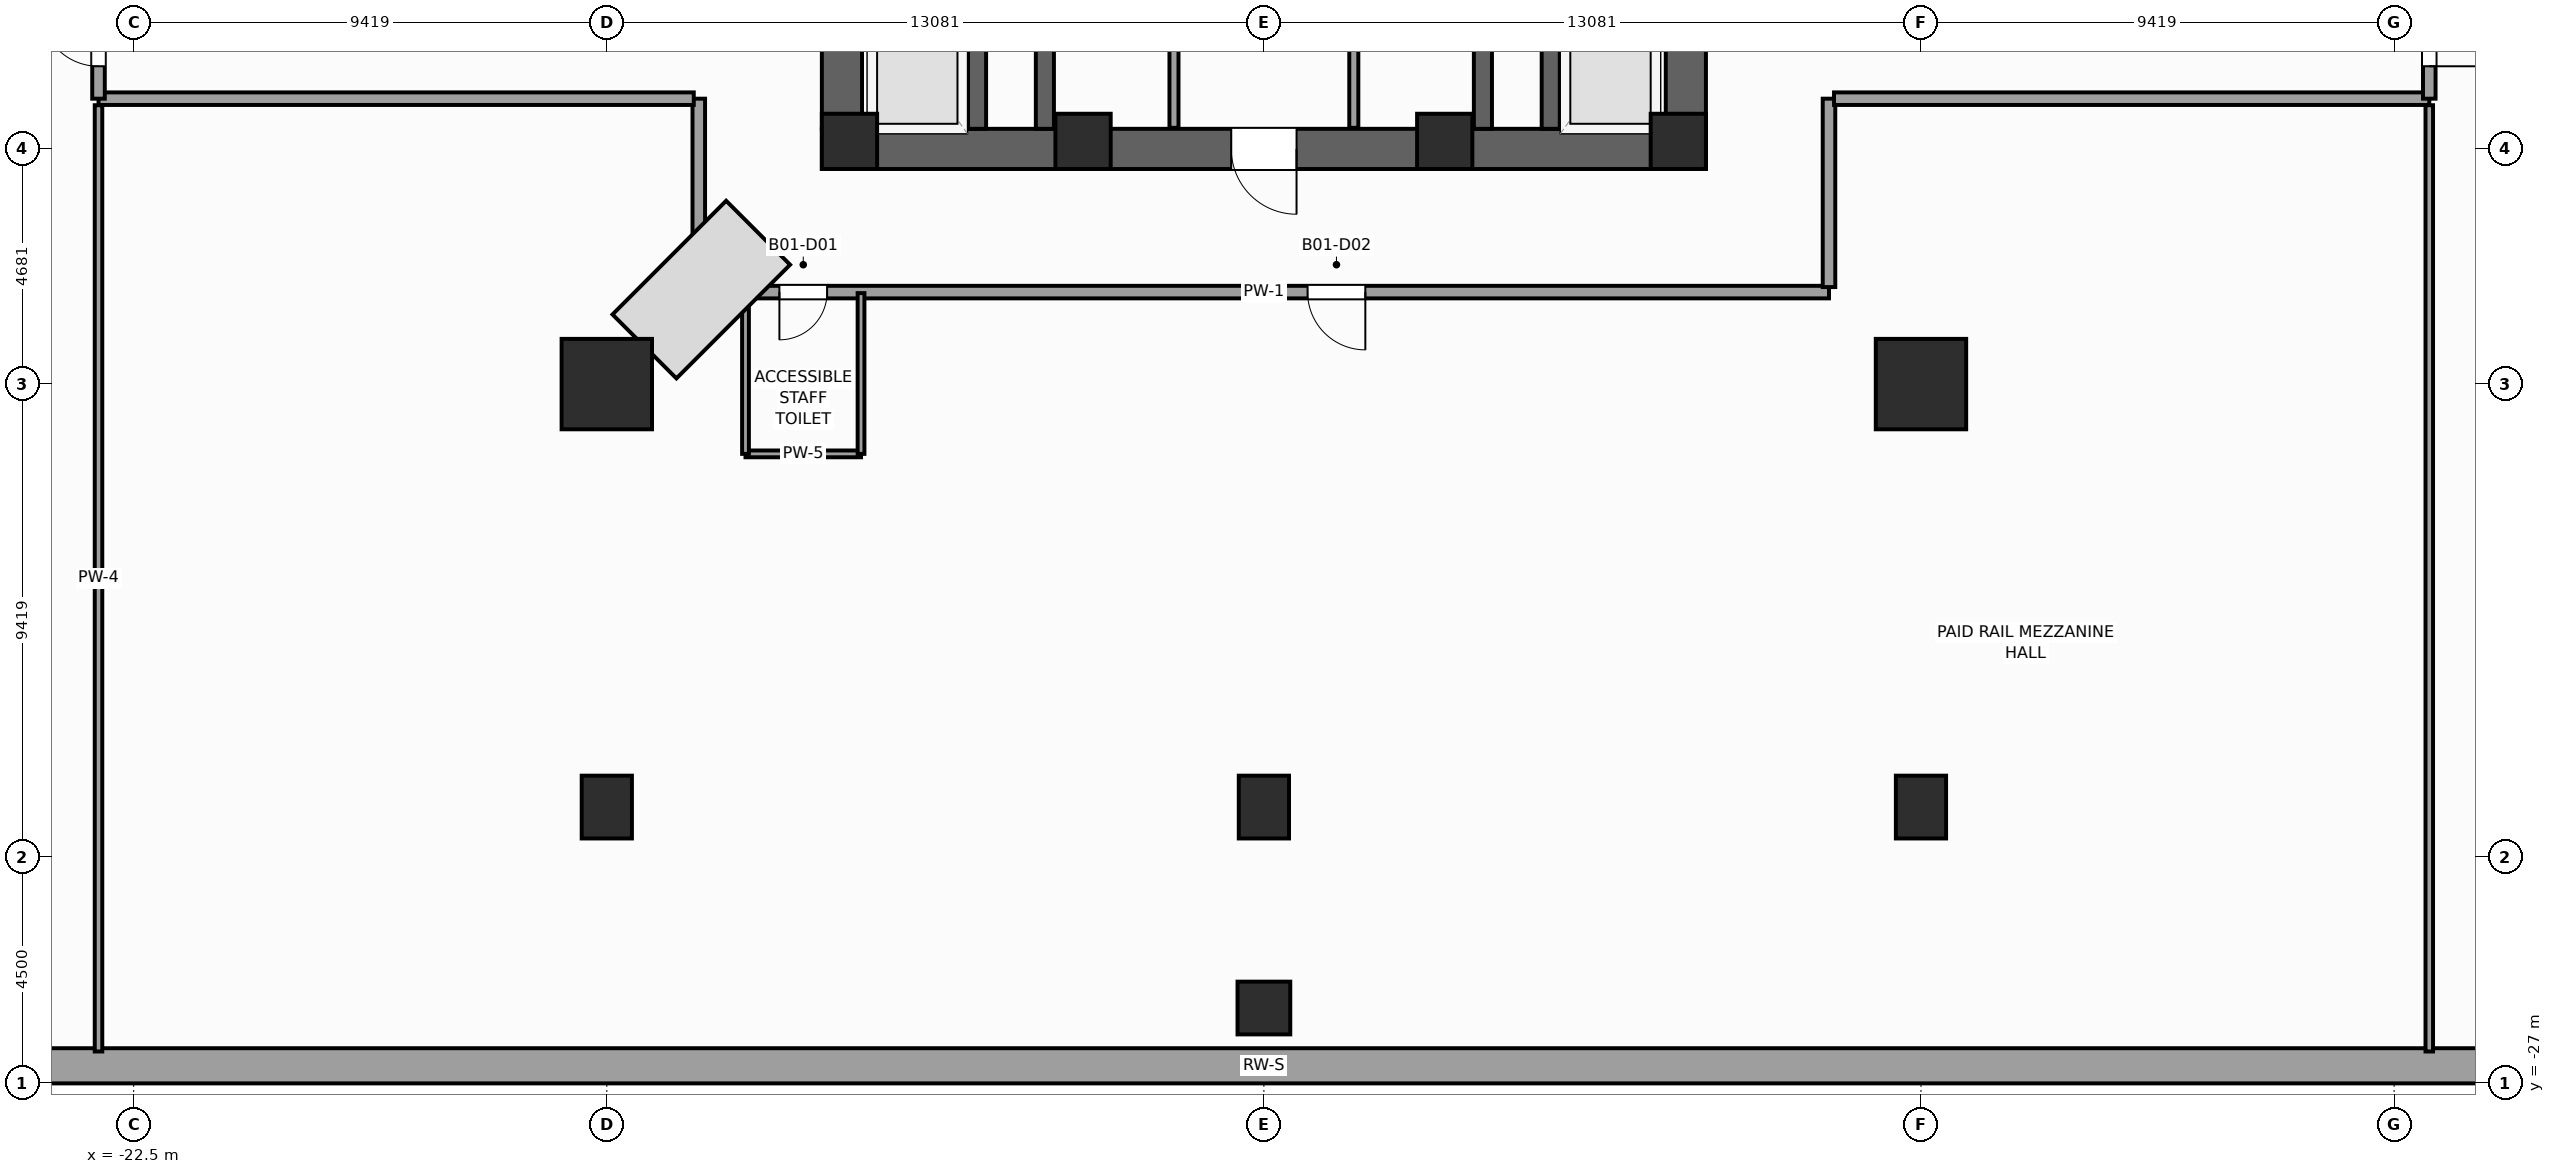
"""IFC4 building model, lengths in metres.
Left out: names, types, materials, properties, quantities, classifications, styles, units other than length and angle.
Written with IfcOpenShell. Run it as: python <this file> out.ifc"""

import sys

from ifc_helpers import new_model, si_unit, direction, frame, frame_2d, origin, origin_2d, place, context, subcontext, project, spatial, rectangle, extrude, source, transform, mapped, element, fill, save


model = new_model("IFC4")
c1 = context("Model", 3, precision=1e-05, world=origin(), true_north=direction((0.0, 1.0)))
c2 = subcontext(c1, "Body", "Model", "MODEL_VIEW")
j1 = project(units=[si_unit("LENGTHUNIT", "METRE"), si_unit("PLANEANGLEUNIT", "RADIAN")], contexts=[c1])
p1 = place(None, origin())
s1 = spatial("IfcSite", under=j1, at=p1, CompositionType="ELEMENT")
p2 = place(p1, origin())
s2 = spatial("IfcBuilding", under=s1, at=p2, CompositionType="ELEMENT")
p3 = place(p2, frame((0.0, 0.0, -4.5)))
s3 = spatial("IfcBuildingStorey", under=s2, at=p3, CompositionType="ELEMENT", Elevation=-4.5)
p4 = place(p3, frame((-8.8, -8.4, 0.0), z_axis=(0.0, 0.0, 1.0), x_axis=(1.0, 0.0, 0.0)))
e1 = element("IfcWall", 1, at=p4, inside=s3, PredefinedType="SHEAR", context=c2, shape_type="SweptSolid", body=[
    extrude(rectangle(XDim=17.6, YDim=0.8, at=frame_2d((8.8, 0.0))), origin(), (0.0, 0.0, 1.0), 4.5),
])
p5 = place(p4, frame((8.15, 0.0, 0.0)))
e2 = element("IfcOpeningElement", 2, at=p5, cuts=e1, PredefinedType="OPENING", context=c2, shape_type="SweptSolid", body=[
    extrude(rectangle(XDim=1.3, YDim=2.2, at=frame_2d((0.65, 1.1))), frame((0.0, 0.41, 0.0), z_axis=(0.0, -1.0, 0.0), x_axis=(1.0, 0.0, 0.0)), (0.0, 0.0, 1.0), 0.82),
])
p6 = place(p3, frame((-8.4, -8.0, 0.0), z_axis=(0.0, 0.0, 1.0), x_axis=(0.0, 1.0, 0.0)))
e3 = element("IfcWall", 3, at=p6, inside=s3, PredefinedType="SHEAR", context=c2, shape_type="SweptSolid", body=[
    extrude(rectangle(XDim=16.0, YDim=0.8, at=frame_2d((8.0, 0.0))), origin(), (0.0, 0.0, 1.0), 4.5),
])
p7 = place(p6, frame((4.69, 0.0, 0.0)))
e4 = element("IfcOpeningElement", 4, at=p7, cuts=e3, PredefinedType="OPENING", context=c2, shape_type="SweptSolid", body=[
    extrude(rectangle(XDim=1.3, YDim=2.2, at=frame_2d((0.65, 1.1))), frame((0.0, 0.41, 0.0), z_axis=(0.0, -1.0, 0.0), x_axis=(1.0, 0.0, 0.0)), (0.0, 0.0, 1.0), 0.82),
])
p8 = place(p3, frame((8.4, -8.0, 0.0), z_axis=(0.0, 0.0, 1.0), x_axis=(0.0, 1.0, 0.0)))
e5 = element("IfcWall", 5, at=p8, inside=s3, PredefinedType="SHEAR", context=c2, shape_type="SweptSolid", body=[
    extrude(rectangle(XDim=16.0, YDim=0.8, at=frame_2d((8.0, 0.0))), origin(), (0.0, 0.0, 1.0), 4.5),
])
p9 = place(p8, frame((4.69, 0.0, 0.0)))
e6 = element("IfcOpeningElement", 6, at=p9, cuts=e5, PredefinedType="OPENING", context=c2, shape_type="SweptSolid", body=[
    extrude(rectangle(XDim=1.3, YDim=2.2, at=frame_2d((0.65, 1.1))), frame((0.0, 0.41, 0.0), z_axis=(0.0, -1.0, 0.0), x_axis=(1.0, 0.0, 0.0)), (0.0, 0.0, 1.0), 0.82),
])
for number, where, z_axis, x_axis in (
    (7, (-4.36, -8.0, 0.0), (0.0, 0.0, 1.0), (0.0, 1.0, 0.0)),
    (8, (4.36, -8.0, 0.0), (0.0, 0.0, 1.0), (0.0, 1.0, 0.0)),
):
    element("IfcWall", number, at=place(p3, frame(where, z_axis=z_axis, x_axis=x_axis)), inside=s3, PredefinedType="SHEAR", context=c2, shape_type="SweptSolid", body=[
        extrude(rectangle(XDim=16.0, YDim=0.36, at=frame_2d((8.0, 0.0))), origin(), (0.0, 0.0, 1.0), 4.5),
    ])
for number, where, z_axis, x_axis in (
    (9, (-5.71, -8.0, 0.0), (0.0, 0.0, 1.0), (0.0, 1.0, 0.0)),
    (10, (5.71, -8.0, 0.0), (0.0, 0.0, 1.0), (0.0, 1.0, 0.0)),
):
    element("IfcWall", number, at=place(p3, frame(where, z_axis=z_axis, x_axis=x_axis)), inside=s3, PredefinedType="SHEAR", context=c2, shape_type="SweptSolid", body=[
        extrude(rectangle(XDim=2.54, YDim=0.36, at=frame_2d((1.27, 0.0))), origin(), (0.0, 0.0, 1.0), 4.5),
    ])
p10 = place(p3, frame((-42.0, -26.65, 0.0), z_axis=(0.0, 0.0, 1.0), x_axis=(1.0, 0.0, 0.0)))
e11 = element("IfcWall", 11, at=p10, inside=s3, PredefinedType="USERDEFINED", context=c2, shape_type="SweptSolid", body=[
    extrude(rectangle(XDim=84.0, YDim=0.7, at=frame_2d((42.0, 0.0))), origin(), (0.0, 0.0, 1.0), 4.5),
])
m1 = source(origin(), c2, "Body", "SweptSolid", [
    extrude(rectangle(XDim=1.1, YDim=1.1, at=origin_2d()), origin(), (0.0, 0.0, 1.0), 4.5),
])
for number, where, z_axis, x_axis in (
    (12, (-8.25, -8.25, 0.0), (0.0, 0.0, 1.0), (1.0, 0.0, 0.0)),
    (13, (8.25, -8.25, 0.0), (0.0, 0.0, 1.0), (1.0, 0.0, 0.0)),
    (14, (-3.6, -8.25, 0.0), (0.0, 0.0, 1.0), (1.0, 0.0, 0.0)),
    (15, (3.6, -8.25, 0.0), (0.0, 0.0, 1.0), (1.0, 0.0, 0.0)),
):
    element("IfcColumn", number, at=place(p3, frame(where, z_axis=z_axis, x_axis=x_axis)), inside=s3, PredefinedType="PILASTER", context=c2, shape_type="MappedRepresentation", body=[
        mapped(m1, transform((0.0, 0.0, 0.0), scale=1.0)),
    ])
m2 = source(origin(), c2, "Body", "SweptSolid", [
    extrude(rectangle(XDim=1.8, YDim=1.8, at=origin_2d()), origin(), (0.0, 0.0, 1.0), 4.5),
])
for number, where, z_axis, x_axis in (
    (16, (-13.081, -13.081, 0.0), (0.0, 0.0, 1.0), (1.0, 0.0, 0.0)),
    (17, (13.081, -13.081, 0.0), (0.0, 0.0, 1.0), (1.0, 0.0, 0.0)),
):
    element("IfcColumn", number, at=place(p3, frame(where, z_axis=z_axis, x_axis=x_axis)), inside=s3, PredefinedType="COLUMN", context=c2, shape_type="MappedRepresentation", body=[
        mapped(m2, transform((0.0, 0.0, 0.0), scale=1.0)),
    ])
m3 = source(origin(), c2, "Body", "SweptSolid", [
    extrude(rectangle(XDim=1.0, YDim=1.25, at=origin_2d()), origin(), (0.0, 0.0, 1.0), 4.5),
])
for number, where, z_axis, x_axis in (
    (18, (-13.081, -21.5, 0.0), (0.0, 0.0, 1.0), (1.0, 0.0, 0.0)),
    (19, (0.0, -21.5, 0.0), (0.0, 0.0, 1.0), (1.0, 0.0, 0.0)),
    (20, (13.081, -21.5, 0.0), (0.0, 0.0, 1.0), (1.0, 0.0, 0.0)),
):
    element("IfcColumn", number, at=place(p3, frame(where, z_axis=z_axis, x_axis=x_axis)), inside=s3, PredefinedType="COLUMN", context=c2, shape_type="MappedRepresentation", body=[
        mapped(m3, transform((0.0, 0.0, 0.0), scale=1.0)),
    ])
m4 = source(origin(), c2, "Body", "SweptSolid", [
    extrude(rectangle(XDim=1.05, YDim=1.05, at=origin_2d()), origin(), (0.0, 0.0, 1.0), 4.5),
])
p11 = place(p3, frame((0.0, -25.5, 0.0), z_axis=(0.0, 0.0, 1.0), x_axis=(1.0, 0.0, 0.0)))
e21 = element("IfcColumn", 21, at=p11, inside=s3, PredefinedType="COLUMN", context=c2, shape_type="MappedRepresentation", body=[
    mapped(m4, transform((0.0, 0.0, 0.0), scale=1.0)),
])
for number, where, z_axis, x_axis in (
    (22, (-1.79, -7.98, 0.0), (0.0, 0.0, 1.0), (0.0, 1.0, 0.0)),
    (23, (1.79, -7.98, 0.0), (0.0, 0.0, 1.0), (0.0, 1.0, 0.0)),
):
    element("IfcWall", number, at=place(p3, frame(where, z_axis=z_axis, x_axis=x_axis)), inside=s3, PredefinedType="PARTITIONING", context=c2, shape_type="SweptSolid", body=[
        extrude(rectangle(XDim=12.38, YDim=0.18, at=frame_2d((6.19, 0.0))), origin(), (0.0, 0.0, 1.0), 4.1),
    ])
p12 = place(p3, frame((-11.25, -11.25, 0.0), z_axis=(0.0, 0.0, 1.0), x_axis=(1.0, 0.0, 0.0)))
e24 = element("IfcWall", 24, at=p12, inside=s3, PredefinedType="PARTITIONING", context=c2, shape_type="SweptSolid", body=[
    extrude(rectangle(XDim=22.5, YDim=0.25, at=frame_2d((11.25, 0.0))), origin(), (0.0, 0.0, 1.0), 4.1),
])
p13 = place(p12, frame((1.605, 0.0, 0.0)))
e25 = element("IfcOpeningElement", 25, at=p13, cuts=e24, PredefinedType="OPENING", context=c2, shape_type="SweptSolid", body=[
    extrude(rectangle(XDim=0.95, YDim=2.1, at=frame_2d((0.475, 1.05))), frame((0.0, 0.135, 0.0), z_axis=(0.0, -1.0, 0.0), x_axis=(1.0, 0.0, 0.0)), (0.0, 0.0, 1.0), 0.27),
])
p14 = place(p12, frame((12.12, 0.0, 0.0)))
e26 = element("IfcOpeningElement", 26, at=p14, cuts=e24, PredefinedType="OPENING", context=c2, shape_type="SweptSolid", body=[
    extrude(rectangle(XDim=1.15, YDim=2.25, at=frame_2d((0.575, 1.125))), frame((0.0, 0.135, 0.0), z_axis=(0.0, -1.0, 0.0), x_axis=(1.0, 0.0, 0.0)), (0.0, 0.0, 1.0), 0.27),
])
for number, where, z_axis, x_axis in (
    (27, (-11.25, -11.15, 0.0), (0.0, 0.0, 1.0), (0.0, 1.0, 0.0)),
    (28, (11.25, -11.15, 0.0), (0.0, 0.0, 1.0), (0.0, 1.0, 0.0)),
):
    element("IfcWall", number, at=place(p3, frame(where, z_axis=z_axis, x_axis=x_axis)), inside=s3, PredefinedType="PARTITIONING", context=c2, shape_type="SweptSolid", body=[
        extrude(rectangle(XDim=3.75, YDim=0.25, at=frame_2d((1.875, 0.0))), origin(), (0.0, 0.0, 1.0), 4.1),
    ])
for number, where, z_axis, x_axis in (
    (29, (-23.2, -7.4, 0.0), (0.0, 0.0, 1.0), (1.0, 0.0, 0.0)),
    (30, (11.35, -7.4, 0.0), (0.0, 0.0, 1.0), (1.0, 0.0, 0.0)),
):
    element("IfcWall", number, at=place(p3, frame(where, z_axis=z_axis, x_axis=x_axis)), inside=s3, PredefinedType="PARTITIONING", context=c2, shape_type="SweptSolid", body=[
        extrude(rectangle(XDim=11.85, YDim=0.25, at=frame_2d((5.925, 0.0))), origin(), (0.0, 0.0, 1.0), 4.1),
    ])
p15 = place(p3, frame((-23.2, -7.4, 0.0), z_axis=(0.0, 0.0, 1.0), x_axis=(0.0, 1.0, 0.0)))
e31 = element("IfcWall", 31, at=p15, inside=s3, PredefinedType="PARTITIONING", context=c2, shape_type="SweptSolid", body=[
    extrude(rectangle(XDim=2.44, YDim=0.25, at=frame_2d((1.22, 0.0))), origin(), (0.0, 0.0, 1.0), 4.1),
])
p16 = place(p15, frame((0.645, 0.0, 0.0)))
e32 = element("IfcOpeningElement", 32, at=p16, cuts=e31, PredefinedType="OPENING", context=c2, shape_type="SweptSolid", body=[
    extrude(rectangle(XDim=1.15, YDim=2.25, at=frame_2d((0.575, 1.125))), frame((0.0, 0.135, 0.0), z_axis=(0.0, -1.0, 0.0), x_axis=(1.0, 0.0, 0.0)), (0.0, 0.0, 1.0), 0.27),
])
p17 = place(p3, frame((23.2, -7.4, 0.0), z_axis=(0.0, 0.0, 1.0), x_axis=(0.0, 1.0, 0.0)))
e33 = element("IfcWall", 33, at=p17, inside=s3, PredefinedType="PARTITIONING", context=c2, shape_type="SweptSolid", body=[
    extrude(rectangle(XDim=2.44, YDim=0.25, at=frame_2d((1.22, 0.0))), origin(), (0.0, 0.0, 1.0), 4.1),
])
p18 = place(p17, frame((0.645, 0.0, 0.0)))
e34 = element("IfcOpeningElement", 34, at=p18, cuts=e33, PredefinedType="OPENING", context=c2, shape_type="SweptSolid", body=[
    extrude(rectangle(XDim=1.15, YDim=2.25, at=frame_2d((0.575, 1.125))), frame((0.0, 0.135, 0.0), z_axis=(0.0, -1.0, 0.0), x_axis=(1.0, 0.0, 0.0)), (0.0, 0.0, 1.0), 0.27),
])
for number, where, z_axis, x_axis in (
    (35, (-23.2, -26.365, 0.0), (0.0, 0.0, 1.0), (0.0, 1.0, 0.0)),
    (36, (23.2, -26.365, 0.0), (0.0, 0.0, 1.0), (0.0, 1.0, 0.0)),
):
    element("IfcWall", number, at=place(p3, frame(where, z_axis=z_axis, x_axis=x_axis)), inside=s3, PredefinedType="PARTITIONING", context=c2, shape_type="SweptSolid", body=[
        extrude(rectangle(XDim=18.835, YDim=0.15, at=frame_2d((9.417, 0.0))), origin(), (0.0, 0.0, 1.0), 4.1),
    ])
p19 = place(p3, frame((-10.32, -14.47, 0.0), z_axis=(0.0, 0.0, 1.0), x_axis=(1.0, 0.0, 0.0)))
e37 = element("IfcWall", 37, at=p19, inside=s3, PredefinedType="PARTITIONING", context=c2, shape_type="SweptSolid", body=[
    extrude(rectangle(XDim=2.3, YDim=0.135, at=frame_2d((1.15, 0.0))), origin(), (0.0, 0.0, 1.0), 4.1),
])
for number, where, z_axis, x_axis in (
    (38, (-8.02, -14.47, 0.0), (0.0, 0.0, 1.0), (0.0, 1.0, 0.0)),
    (39, (-10.32, -14.47, 0.0), (0.0, 0.0, 1.0), (0.0, 1.0, 0.0)),
):
    element("IfcWall", number, at=place(p3, frame(where, z_axis=z_axis, x_axis=x_axis)), inside=s3, PredefinedType="PARTITIONING", context=c2, shape_type="SweptSolid", body=[
        extrude(rectangle(XDim=3.2, YDim=0.135, at=frame_2d((1.6, 0.0))), origin(), (0.0, 0.0, 1.0), 4.1),
    ])
m5 = source(origin(), c2, "Body", "SweptSolid", [
    extrude(rectangle(XDim=1.3, YDim=2.2, at=frame_2d((0.65, 1.1))), frame((0.0, 0.025, 0.0), z_axis=(0.0, -1.0, 0.0), x_axis=(1.0, 0.0, 0.0)), (0.0, 0.0, 1.0), 0.05),
])
p20 = place(p5, frame((1.3, 0.0, 0.0), z_axis=(0.0, 0.0, 1.0), x_axis=(-1.0, 0.0, 0.0)))
e40 = element("IfcDoor", 40, at=p20, inside=s3, OperationType="SINGLE_SWING_RIGHT", PredefinedType="DOOR", context=c2, shape_type="MappedRepresentation", body=[
    mapped(m5, transform((0.0, 0.0, 0.0), scale=1.0)),
])
fill(e2, e40)
m6 = source(origin(), c2, "Body", "SweptSolid", [
    extrude(rectangle(XDim=0.95, YDim=2.1, at=frame_2d((0.475, 1.05))), frame((0.0, 0.025, 0.0), z_axis=(0.0, -1.0, 0.0), x_axis=(1.0, 0.0, 0.0)), (0.0, 0.0, 1.0), 0.05),
])
p21 = place(p13, frame((0.95, 0.0, 0.0), z_axis=(0.0, 0.0, 1.0), x_axis=(-1.0, 0.0, 0.0)))
e41 = element("IfcDoor", 41, at=p21, inside=s3, OperationType="SINGLE_SWING_LEFT", PredefinedType="DOOR", context=c2, shape_type="MappedRepresentation", body=[
    mapped(m6, transform((0.0, 0.0, 0.0), scale=1.0)),
])
fill(e25, e41)
m7 = source(origin(), c2, "Body", "SweptSolid", [
    extrude(rectangle(XDim=1.15, YDim=2.25, at=frame_2d((0.575, 1.125))), frame((0.0, 0.025, 0.0), z_axis=(0.0, -1.0, 0.0), x_axis=(1.0, 0.0, 0.0)), (0.0, 0.0, 1.0), 0.05),
])
p22 = place(p14, frame((1.15, 0.0, 0.0), z_axis=(0.0, 0.0, 1.0), x_axis=(-1.0, 0.0, 0.0)))
e42 = element("IfcDoor", 42, at=p22, inside=s3, OperationType="SINGLE_SWING_RIGHT", PredefinedType="DOOR", context=c2, shape_type="MappedRepresentation", body=[
    mapped(m7, transform((0.0, 0.0, 0.0), scale=1.0)),
])
fill(e26, e42)
p23 = place(p16, origin())
e43 = element("IfcDoor", 43, at=p23, inside=s3, OperationType="SINGLE_SWING_RIGHT", PredefinedType="DOOR", context=c2, shape_type="MappedRepresentation", body=[
    mapped(m7, transform((0.0, 0.0, 0.0), scale=1.0)),
])
fill(e32, e43)
p24 = place(p18, frame((1.15, 0.0, 0.0), z_axis=(0.0, 0.0, 1.0), x_axis=(-1.0, 0.0, 0.0)))
e44 = element("IfcDoor", 44, at=p24, inside=s3, OperationType="SINGLE_SWING_LEFT", PredefinedType="DOOR", context=c2, shape_type="MappedRepresentation", body=[
    mapped(m7, transform((0.0, 0.0, 0.0), scale=1.0)),
])
fill(e34, e44)
save(model, sys.argv[1])
